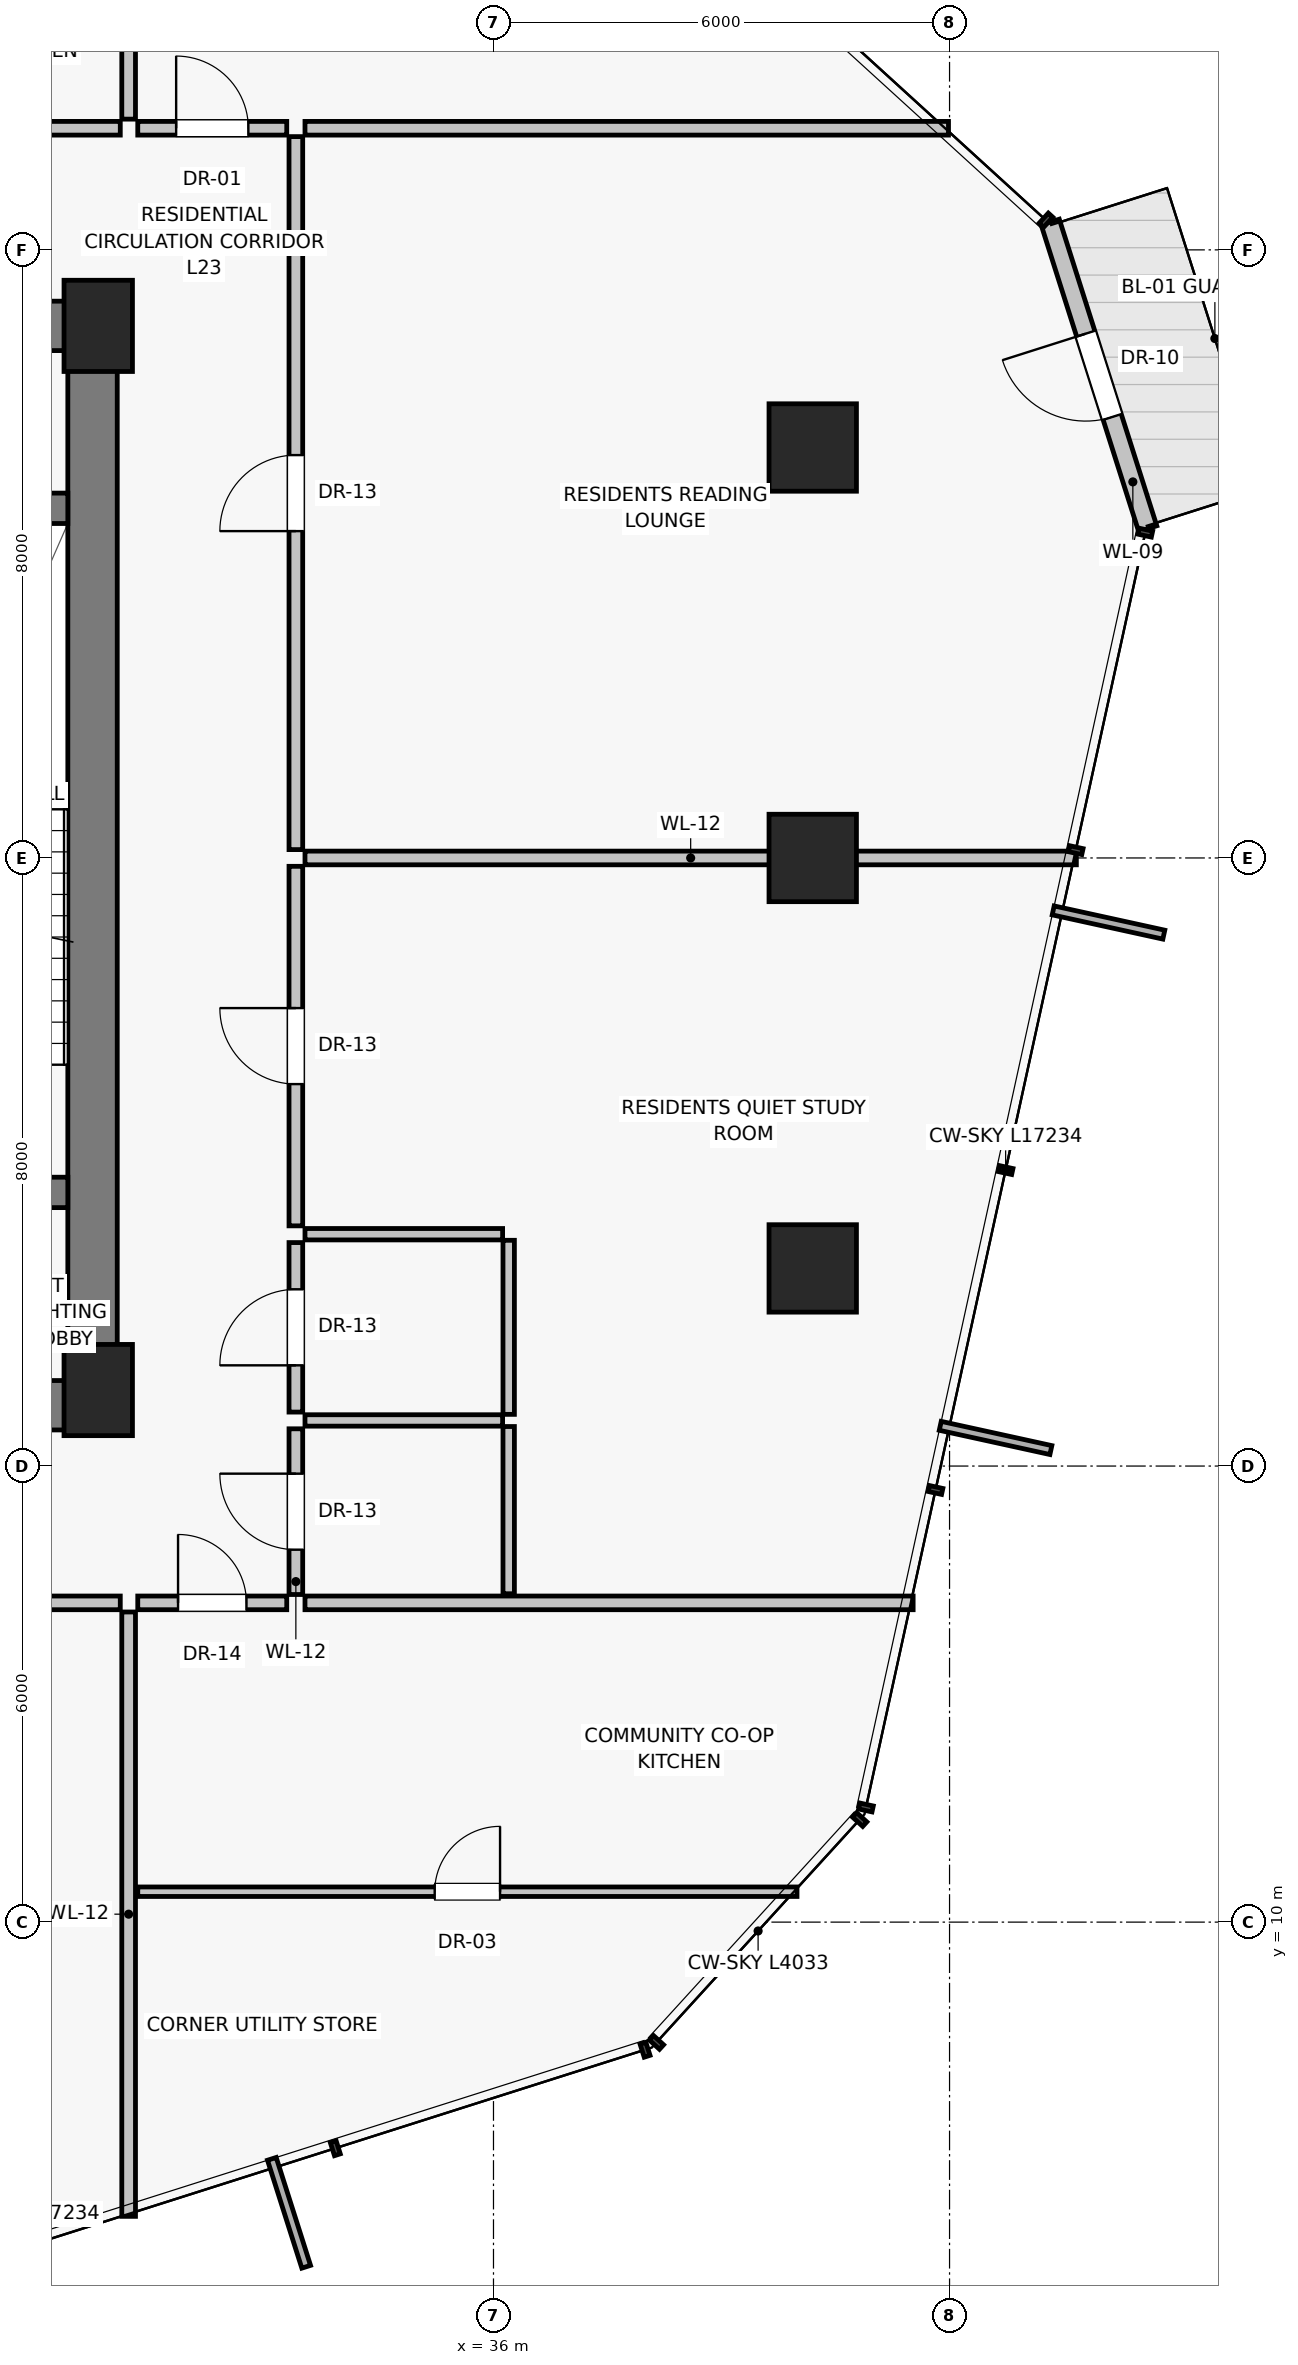
"""IFC4 building model, lengths in metres.
Left out: names, types, materials, properties, quantities, classifications, styles, units other than length and angle.
Written with IfcOpenShell. Run it as: python <this file> out.ifc"""

import sys

from ifc_helpers import new_model, si_unit, direction, frame, frame_2d, origin, origin_2d, place, context, subcontext, project, spatial, rectangle, extrude, source, transform, mapped, element, fill, save


model = new_model("IFC4")
c1 = context("Model", 3, precision=1e-05, world=origin(), true_north=direction((0.0, 1.0)))
c2 = subcontext(c1, "Body", "Model", "MODEL_VIEW")
j1 = project(units=[si_unit("LENGTHUNIT", "METRE"), si_unit("PLANEANGLEUNIT", "RADIAN")], contexts=[c1])
p1 = place(None, origin())
s1 = spatial("IfcSite", under=j1, at=p1, CompositionType="ELEMENT")
p2 = place(p1, origin())
s2 = spatial("IfcBuilding", under=s1, at=p2, CompositionType="ELEMENT")
p3 = place(p2, frame((0.0, 0.0, 85.15)))
s3 = spatial("IfcBuildingStorey", under=s2, at=p3, CompositionType="ELEMENT", Elevation=85.15)
for number, where, z_axis, x_axis in (
    (1, (30.8, 17.0, 0.0), (0.0, 0.0, 1.0), (1.0, 0.0, 0.0)),
    (2, (30.8, 31.0, 0.0), (0.0, 0.0, 1.0), (1.0, 0.0, 0.0)),
):
    element("IfcColumn", number, at=place(p3, frame(where, z_axis=z_axis, x_axis=x_axis)), inside=s3, PredefinedType="PILASTER", context=c2, shape_type="SweptSolid", body=[
        extrude(rectangle(XDim=0.9, YDim=1.2, at=origin_2d()), origin(), (0.0, 0.0, 1.0), 4.3),
    ])
for number, where, z_axis, x_axis in (
    (3, (40.2, 18.6, -0.32), (0.0, 0.0, 1.0), (1.0, 0.0, 0.0)),
    (4, (40.2, 24.0, -0.32), (0.0, 0.0, 1.0), (1.0, 0.0, 0.0)),
    (5, (40.2, 29.4, -0.32), (0.0, 0.0, 1.0), (1.0, 0.0, 0.0)),
):
    element("IfcColumn", number, at=place(p3, frame(where, z_axis=z_axis, x_axis=x_axis)), inside=s3, PredefinedType="COLUMN", context=c2, shape_type="SweptSolid", body=[
        extrude(rectangle(XDim=1.15, YDim=1.15, at=origin_2d()), origin(), (0.0, 0.0, 1.0), 4.62),
    ])
p4 = place(p3, frame((44.607, 28.332, 0.0), z_axis=(0.0, 0.0, 1.0), x_axis=(-0.303013211756, 0.952986355359, 0.0)))
e6 = element("IfcWall", 6, at=p4, inside=s3, PredefinedType="SOLIDWALL", context=c2, shape_type="SweptSolid", body=[
    extrude(rectangle(XDim=4.233, YDim=0.25, at=frame_2d((2.117, 0.0))), origin(), (0.0, 0.0, 1.0), 4.05),
])
p5 = place(p4, frame((1.542, 0.0, 0.0)))
e7 = element("IfcOpeningElement", 7, at=p5, cuts=e6, PredefinedType="OPENING", context=c2, shape_type="SweptSolid", body=[
    extrude(rectangle(XDim=1.15, YDim=2.25, at=frame_2d((0.575, 1.125))), frame((0.0, 0.135, 0.0), z_axis=(0.0, -1.0, 0.0), x_axis=(1.0, 0.0, 0.0)), (0.0, 0.0, 1.0), 0.27),
])
p6 = place(p3, frame((30.725, 16.8, 0.0), z_axis=(0.0, 0.0, 1.0), x_axis=(0.0, 1.0, 0.0)))
e8 = element("IfcWall", 8, at=p6, inside=s3, PredefinedType="SHEAR", context=c2, shape_type="SweptSolid", body=[
    extrude(rectangle(XDim=14.2, YDim=0.65, at=frame_2d((7.1, 0.0))), origin(), (0.0, 0.0, 1.0), 4.05),
])
p7 = place(p3, frame((24.95, 16.8, 0.0), z_axis=(0.0, 0.0, 1.0), x_axis=(1.0, 0.0, 0.0)))
e9 = element("IfcWall", 9, at=p7, inside=s3, PredefinedType="SHEAR", context=c2, shape_type="SweptSolid", body=[
    extrude(rectangle(XDim=5.85, YDim=0.65, at=frame_2d((2.925, 0.0))), origin(), (0.0, 0.0, 1.0), 4.05),
])
p8 = place(p7, frame((2.15, 0.0, 0.0)))
e10 = element("IfcOpeningElement", 10, at=p8, cuts=e9, PredefinedType="OPENING", context=c2, shape_type="SweptSolid", body=[
    extrude(rectangle(XDim=1.2, YDim=2.03, at=frame_2d((0.6, 1.015))), frame((0.0, 0.335, 0.0), z_axis=(0.0, -1.0, 0.0), x_axis=(1.0, 0.0, 0.0)), (0.0, 0.0, 1.0), 0.67),
])
p9 = place(p3, frame((27.0, 31.0, 0.0), z_axis=(0.0, 0.0, 1.0), x_axis=(1.0, 0.0, 0.0)))
e11 = element("IfcWall", 11, at=p9, inside=s3, PredefinedType="SHEAR", context=c2, shape_type="SweptSolid", body=[
    extrude(rectangle(XDim=3.8, YDim=0.65, at=frame_2d((1.9, 0.0))), origin(), (0.0, 0.0, 1.0), 4.05),
])
p10 = place(p9, frame((0.45, 0.0, 0.0)))
e12 = element("IfcOpeningElement", 12, at=p10, cuts=e11, PredefinedType="OPENING", context=c2, shape_type="SweptSolid", body=[
    extrude(rectangle(XDim=0.86, YDim=2.01, at=frame_2d((0.43, 1.005))), frame((0.0, 0.335, 0.0), z_axis=(0.0, -1.0, 0.0), x_axis=(1.0, 0.0, 0.0)), (0.0, 0.0, 1.0), 0.67),
])
p11 = place(p9, frame((1.9, 0.0, 0.0)))
e13 = element("IfcOpeningElement", 13, at=p11, cuts=e11, PredefinedType="OPENING", context=c2, shape_type="SweptSolid", body=[
    extrude(rectangle(XDim=0.86, YDim=2.01, at=frame_2d((0.43, 1.005))), frame((0.0, 0.335, 0.0), z_axis=(0.0, -1.0, 0.0), x_axis=(1.0, 0.0, 0.0)), (0.0, 0.0, 1.0), 0.67),
])
p12 = place(p3, frame((27.0, 19.6, 0.0), z_axis=(0.0, 0.0, 1.0), x_axis=(1.0, 0.0, 0.0)))
e14 = element("IfcWall", 14, at=p12, inside=s3, PredefinedType="SHEAR", context=c2, shape_type="SweptSolid", body=[
    extrude(rectangle(XDim=3.4, YDim=0.4, at=frame_2d((1.7, 0.0))), origin(), (0.0, 0.0, 1.0), 4.05),
])
p13 = place(p12, frame((1.05, 0.0, 0.0)))
e15 = element("IfcOpeningElement", 15, at=p13, cuts=e14, PredefinedType="OPENING", context=c2, shape_type="SweptSolid", body=[
    extrude(rectangle(XDim=1.1, YDim=2.03, at=frame_2d((0.55, 1.015))), frame((0.0, 0.21, 0.0), z_axis=(0.0, -1.0, 0.0), x_axis=(1.0, 0.0, 0.0)), (0.0, 0.0, 1.0), 0.42),
])
p14 = place(p3, frame((27.0, 28.6, 0.0), z_axis=(0.0, 0.0, 1.0), x_axis=(1.0, 0.0, 0.0)))
e16 = element("IfcWall", 16, at=p14, inside=s3, PredefinedType="SHEAR", context=c2, shape_type="SweptSolid", body=[
    extrude(rectangle(XDim=3.4, YDim=0.4, at=frame_2d((1.7, 0.0))), origin(), (0.0, 0.0, 1.0), 4.05),
])
p15 = place(p3, frame((31.2, 14.08, 0.0), z_axis=(0.0, 0.0, 1.0), x_axis=(0.0, -1.0, 0.0)))
e17 = element("IfcWall", 17, at=p15, inside=s3, PredefinedType="PARTITIONING", context=c2, shape_type="SweptSolid", body=[
    extrude(rectangle(XDim=7.951, YDim=0.18, at=frame_2d((3.976, 0.0))), origin(), (0.0, 0.0, 1.0), 4.05),
])
p16 = place(p3, frame((25.118, 14.2, 0.0), z_axis=(0.0, 0.0, 1.0), x_axis=(1.0, 0.0, 0.0)))
e18 = element("IfcWall", 18, at=p16, inside=s3, PredefinedType="PARTITIONING", context=c2, shape_type="SweptSolid", body=[
    extrude(rectangle(XDim=5.972, YDim=0.18, at=frame_2d((2.986, 0.0))), origin(), (0.0, 0.0, 1.0), 4.05),
])
p17 = place(p16, frame((2.486, 0.0, 0.0)))
e19 = element("IfcOpeningElement", 19, at=p17, cuts=e18, PredefinedType="OPENING", context=c2, shape_type="SweptSolid", body=[
    extrude(rectangle(XDim=1.0, YDim=2.01, at=frame_2d((0.5, 1.005))), frame((0.0, 0.1, 0.0), z_axis=(0.0, -1.0, 0.0), x_axis=(1.0, 0.0, 0.0)), (0.0, 0.0, 1.0), 0.2),
])
p18 = place(p3, frame((31.2, 33.72, 0.0), z_axis=(0.0, 0.0, 1.0), x_axis=(0.0, 1.0, 0.0)))
e20 = element("IfcWall", 20, at=p18, inside=s3, PredefinedType="PARTITIONING", context=c2, shape_type="SweptSolid", body=[
    extrude(rectangle(XDim=9.715, YDim=0.18, at=frame_2d((4.858, 0.0))), origin(), (0.0, 0.0, 1.0), 4.05),
])
p19 = place(p3, frame((21.23, 33.6, 0.0), z_axis=(0.0, 0.0, 1.0), x_axis=(1.0, 0.0, 0.0)))
e21 = element("IfcWall", 21, at=p19, inside=s3, PredefinedType="PARTITIONING", context=c2, shape_type="SweptSolid", body=[
    extrude(rectangle(XDim=9.86, YDim=0.18, at=frame_2d((4.93, 0.0))), origin(), (0.0, 0.0, 1.0), 4.05),
])
p20 = place(p19, frame((3.276, 0.0, 0.0)))
e22 = element("IfcOpeningElement", 22, at=p20, cuts=e21, PredefinedType="OPENING", context=c2, shape_type="SweptSolid", body=[
    extrude(rectangle(XDim=0.95, YDim=2.02, at=frame_2d((0.475, 1.01))), frame((0.0, 0.1, 0.0), z_axis=(0.0, -1.0, 0.0), x_axis=(1.0, 0.0, 0.0)), (0.0, 0.0, 1.0), 0.2),
])
p21 = place(p3, frame((33.52, 14.2, 0.0), z_axis=(0.0, 0.0, 1.0), x_axis=(1.0, 0.0, 0.0)))
e23 = element("IfcWall", 23, at=p21, inside=s3, PredefinedType="PARTITIONING", context=c2, shape_type="SweptSolid", body=[
    extrude(rectangle(XDim=8.001, YDim=0.18, at=frame_2d((4.0, 0.0))), origin(), (0.0, 0.0, 1.0), 4.05),
])
p22 = place(p3, frame((33.52, 33.6, 0.0), z_axis=(0.0, 0.0, 1.0), x_axis=(1.0, 0.0, 0.0)))
e24 = element("IfcWall", 24, at=p22, inside=s3, PredefinedType="PARTITIONING", context=c2, shape_type="SweptSolid", body=[
    extrude(rectangle(XDim=8.466, YDim=0.18, at=frame_2d((4.233, 0.0))), origin(), (0.0, 0.0, 1.0), 4.05),
])
p23 = place(p3, frame((33.4, 14.31, 0.0), z_axis=(0.0, 0.0, 1.0), x_axis=(0.0, 1.0, 0.0)))
e25 = element("IfcWall", 25, at=p23, inside=s3, PredefinedType="PARTITIONING", context=c2, shape_type="SweptSolid", body=[
    extrude(rectangle(XDim=2.18, YDim=0.18, at=frame_2d((1.09, 0.0))), origin(), (0.0, 0.0, 1.0), 4.05),
])
p24 = place(p23, frame((0.59, 0.0, 0.0)))
e26 = element("IfcOpeningElement", 26, at=p24, cuts=e25, PredefinedType="OPENING", context=c2, shape_type="SweptSolid", body=[
    extrude(rectangle(XDim=1.0, YDim=2.01, at=frame_2d((0.5, 1.005))), frame((0.0, 0.1, 0.0), z_axis=(0.0, -1.0, 0.0), x_axis=(1.0, 0.0, 0.0)), (0.0, 0.0, 1.0), 0.2),
])
p25 = place(p3, frame((33.4, 16.71, 0.0), z_axis=(0.0, 0.0, 1.0), x_axis=(0.0, 1.0, 0.0)))
e27 = element("IfcWall", 27, at=p25, inside=s3, PredefinedType="PARTITIONING", context=c2, shape_type="SweptSolid", body=[
    extrude(rectangle(XDim=2.23, YDim=0.18, at=frame_2d((1.115, 0.0))), origin(), (0.0, 0.0, 1.0), 4.05),
])
p26 = place(p25, frame((0.615, 0.0, 0.0)))
e28 = element("IfcOpeningElement", 28, at=p26, cuts=e27, PredefinedType="OPENING", context=c2, shape_type="SweptSolid", body=[
    extrude(rectangle(XDim=1.0, YDim=2.01, at=frame_2d((0.5, 1.005))), frame((0.0, 0.1, 0.0), z_axis=(0.0, -1.0, 0.0), x_axis=(1.0, 0.0, 0.0)), (0.0, 0.0, 1.0), 0.2),
])
p27 = place(p3, frame((33.4, 19.16, 0.0), z_axis=(0.0, 0.0, 1.0), x_axis=(0.0, 1.0, 0.0)))
e29 = element("IfcWall", 29, at=p27, inside=s3, PredefinedType="PARTITIONING", context=c2, shape_type="SweptSolid", body=[
    extrude(rectangle(XDim=4.73, YDim=0.18, at=frame_2d((2.365, 0.0))), origin(), (0.0, 0.0, 1.0), 4.05),
])
p28 = place(p27, frame((1.865, 0.0, 0.0)))
e30 = element("IfcOpeningElement", 30, at=p28, cuts=e29, PredefinedType="OPENING", context=c2, shape_type="SweptSolid", body=[
    extrude(rectangle(XDim=1.0, YDim=2.01, at=frame_2d((0.5, 1.005))), frame((0.0, 0.1, 0.0), z_axis=(0.0, -1.0, 0.0), x_axis=(1.0, 0.0, 0.0)), (0.0, 0.0, 1.0), 0.2),
])
p29 = place(p3, frame((33.4, 24.11, 0.0), z_axis=(0.0, 0.0, 1.0), x_axis=(0.0, 1.0, 0.0)))
e31 = element("IfcWall", 31, at=p29, inside=s3, PredefinedType="PARTITIONING", context=c2, shape_type="SweptSolid", body=[
    extrude(rectangle(XDim=9.38, YDim=0.18, at=frame_2d((4.69, 0.0))), origin(), (0.0, 0.0, 1.0), 4.05),
])
p30 = place(p29, frame((4.19, 0.0, 0.0)))
e32 = element("IfcOpeningElement", 32, at=p30, cuts=e31, PredefinedType="OPENING", context=c2, shape_type="SweptSolid", body=[
    extrude(rectangle(XDim=1.0, YDim=2.01, at=frame_2d((0.5, 1.005))), frame((0.0, 0.1, 0.0), z_axis=(0.0, -1.0, 0.0), x_axis=(1.0, 0.0, 0.0)), (0.0, 0.0, 1.0), 0.2),
])
for number, where, z_axis, x_axis in (
    (33, (33.52, 16.6, 0.0), (0.0, 0.0, 1.0), (1.0, 0.0, 0.0)),
    (34, (33.52, 19.05, 0.0), (0.0, 0.0, 1.0), (1.0, 0.0, 0.0)),
):
    element("IfcWall", number, at=place(p3, frame(where, z_axis=z_axis, x_axis=x_axis)), inside=s3, PredefinedType="PARTITIONING", context=c2, shape_type="SweptSolid", body=[
        extrude(rectangle(XDim=2.6, YDim=0.15, at=frame_2d((1.3, 0.0))), origin(), (0.0, 0.0, 1.0), 4.05),
    ])
p31 = place(p3, frame((36.2, 14.32, 0.0), z_axis=(0.0, 0.0, 1.0), x_axis=(0.0, 1.0, 0.0)))
e35 = element("IfcWall", 35, at=p31, inside=s3, PredefinedType="PARTITIONING", context=c2, shape_type="SweptSolid", body=[
    extrude(rectangle(XDim=2.2, YDim=0.15, at=frame_2d((1.1, 0.0))), origin(), (0.0, 0.0, 1.0), 4.05),
])
p32 = place(p3, frame((36.2, 16.68, 0.0), z_axis=(0.0, 0.0, 1.0), x_axis=(0.0, 1.0, 0.0)))
e36 = element("IfcWall", 36, at=p32, inside=s3, PredefinedType="PARTITIONING", context=c2, shape_type="SweptSolid", body=[
    extrude(rectangle(XDim=2.29, YDim=0.15, at=frame_2d((1.145, 0.0))), origin(), (0.0, 0.0, 1.0), 3.63),
])
p33 = place(p3, frame((33.52, 24.0, 0.0), z_axis=(0.0, 0.0, 1.0), x_axis=(1.0, 0.0, 0.0)))
e37 = element("IfcWall", 37, at=p33, inside=s3, PredefinedType="PARTITIONING", context=c2, shape_type="SweptSolid", body=[
    extrude(rectangle(XDim=10.148, YDim=0.18, at=frame_2d((5.074, 0.0))), origin(), (0.0, 0.0, 1.0), 4.05),
])
p34 = place(p3, frame((31.32, 14.2, 0.0), z_axis=(0.0, 0.0, 1.0), x_axis=(1.0, 0.0, 0.0)))
e38 = element("IfcWall", 38, at=p34, inside=s3, PredefinedType="PARTITIONING", context=c2, shape_type="SweptSolid", body=[
    extrude(rectangle(XDim=1.96, YDim=0.18, at=frame_2d((0.98, 0.0))), origin(), (0.0, 0.0, 1.0), 4.05),
])
p35 = place(p34, frame((0.53, 0.0, 0.0)))
e39 = element("IfcOpeningElement", 39, at=p35, cuts=e38, PredefinedType="OPENING", context=c2, shape_type="SweptSolid", body=[
    extrude(rectangle(XDim=0.9, YDim=2.01, at=frame_2d((0.45, 1.005))), frame((0.0, 0.1, 0.0), z_axis=(0.0, -1.0, 0.0), x_axis=(1.0, 0.0, 0.0)), (0.0, 0.0, 1.0), 0.2),
])
p36 = place(p3, frame((31.32, 10.4, 0.0), z_axis=(0.0, 0.0, 1.0), x_axis=(1.0, 0.0, 0.0)))
e40 = element("IfcWall", 40, at=p36, inside=s3, PredefinedType="PARTITIONING", context=c2, shape_type="SweptSolid", body=[
    extrude(rectangle(XDim=8.673, YDim=0.125, at=frame_2d((4.336, 0.0))), origin(), (0.0, 0.0, 1.0), 4.05),
])
p37 = place(p36, frame((3.906, 0.0, 0.0)))
e41 = element("IfcOpeningElement", 41, at=p37, cuts=e40, PredefinedType="OPENING", context=c2, shape_type="SweptSolid", body=[
    extrude(rectangle(XDim=0.86, YDim=2.01, at=frame_2d((0.43, 1.005))), frame((0.0, 0.073, 0.0), z_axis=(0.0, -1.0, 0.0), x_axis=(1.0, 0.0, 0.0)), (0.0, 0.0, 1.0), 0.145),
])
p38 = place(p3, frame((31.32, 33.6, 0.0), z_axis=(0.0, 0.0, 1.0), x_axis=(1.0, 0.0, 0.0)))
e42 = element("IfcWall", 42, at=p38, inside=s3, PredefinedType="PARTITIONING", context=c2, shape_type="SweptSolid", body=[
    extrude(rectangle(XDim=1.96, YDim=0.18, at=frame_2d((0.98, 0.0))), origin(), (0.0, 0.0, 1.0), 4.05),
])
p39 = place(p38, frame((0.505, 0.0, 0.0)))
e43 = element("IfcOpeningElement", 43, at=p39, cuts=e42, PredefinedType="OPENING", context=c2, shape_type="SweptSolid", body=[
    extrude(rectangle(XDim=0.95, YDim=2.02, at=frame_2d((0.475, 1.01))), frame((0.0, 0.1, 0.0), z_axis=(0.0, -1.0, 0.0), x_axis=(1.0, 0.0, 0.0)), (0.0, 0.0, 1.0), 0.2),
])
m1 = source(origin(), c2, "Body", "SweptSolid", [
    extrude(rectangle(XDim=1.15, YDim=2.25, at=frame_2d((0.575, 1.125))), frame((0.0, 0.025, 0.0), z_axis=(0.0, -1.0, 0.0), x_axis=(1.0, 0.0, 0.0)), (0.0, 0.0, 1.0), 0.05),
])
p40 = place(p5, frame((1.15, 0.0, 0.0), z_axis=(0.0, 0.0, 1.0), x_axis=(-1.0, 0.0, 0.0)))
e44 = element("IfcDoor", 44, at=p40, inside=s3, OperationType="SINGLE_SWING_RIGHT", PredefinedType="DOOR", context=c2, shape_type="MappedRepresentation", body=[
    mapped(m1, transform((0.0, 0.0, 0.0), scale=1.0)),
])
fill(e7, e44)
m2 = source(origin(), c2, "Body", "SweptSolid", [
    extrude(rectangle(XDim=1.0, YDim=2.01, at=frame_2d((0.5, 1.005))), frame((0.0, 0.025, 0.0), z_axis=(0.0, -1.0, 0.0), x_axis=(1.0, 0.0, 0.0)), (0.0, 0.0, 1.0), 0.05),
])
p41 = place(p24, origin())
e45 = element("IfcDoor", 45, at=p41, inside=s3, OperationType="SINGLE_SWING_RIGHT", PredefinedType="DOOR", context=c2, shape_type="MappedRepresentation", body=[
    mapped(m2, transform((0.0, 0.0, 0.0), scale=1.0)),
])
fill(e26, e45)
p42 = place(p26, origin())
e46 = element("IfcDoor", 46, at=p42, inside=s3, OperationType="SINGLE_SWING_LEFT", PredefinedType="DOOR", context=c2, shape_type="MappedRepresentation", body=[
    mapped(m2, transform((0.0, 0.0, 0.0), scale=1.0)),
])
fill(e28, e46)
p43 = place(p28, origin())
e47 = element("IfcDoor", 47, at=p43, inside=s3, OperationType="SINGLE_SWING_RIGHT", PredefinedType="DOOR", context=c2, shape_type="MappedRepresentation", body=[
    mapped(m2, transform((0.0, 0.0, 0.0), scale=1.0)),
])
fill(e30, e47)
p44 = place(p30, origin())
e48 = element("IfcDoor", 48, at=p44, inside=s3, OperationType="SINGLE_SWING_LEFT", PredefinedType="DOOR", context=c2, shape_type="MappedRepresentation", body=[
    mapped(m2, transform((0.0, 0.0, 0.0), scale=1.0)),
])
fill(e32, e48)
m3 = source(origin(), c2, "Body", "SweptSolid", [
    extrude(rectangle(XDim=0.9, YDim=2.01, at=frame_2d((0.45, 1.005))), frame((0.0, 0.025, 0.0), z_axis=(0.0, -1.0, 0.0), x_axis=(1.0, 0.0, 0.0)), (0.0, 0.0, 1.0), 0.05),
])
p45 = place(p35, origin())
e49 = element("IfcDoor", 49, at=p45, inside=s3, OperationType="SINGLE_SWING_LEFT", PredefinedType="DOOR", context=c2, shape_type="MappedRepresentation", body=[
    mapped(m3, transform((0.0, 0.0, 0.0), scale=1.0)),
])
fill(e39, e49)
m4 = source(origin(), c2, "Body", "SweptSolid", [
    extrude(rectangle(XDim=0.86, YDim=2.01, at=frame_2d((0.43, 1.005))), frame((0.0, 0.025, 0.0), z_axis=(0.0, -1.0, 0.0), x_axis=(1.0, 0.0, 0.0)), (0.0, 0.0, 1.0), 0.05),
])
p46 = place(p37, origin())
e50 = element("IfcDoor", 50, at=p46, inside=s3, OperationType="SINGLE_SWING_RIGHT", PredefinedType="DOOR", context=c2, shape_type="MappedRepresentation", body=[
    mapped(m4, transform((0.0, 0.0, 0.0), scale=1.0)),
])
fill(e41, e50)
m5 = source(origin(), c2, "Body", "SweptSolid", [
    extrude(rectangle(XDim=0.95, YDim=2.02, at=frame_2d((0.475, 1.01))), frame((0.0, 0.025, 0.0), z_axis=(0.0, -1.0, 0.0), x_axis=(1.0, 0.0, 0.0)), (0.0, 0.0, 1.0), 0.05),
])
p47 = place(p39, origin())
e51 = element("IfcDoor", 51, at=p47, inside=s3, OperationType="SINGLE_SWING_LEFT", PredefinedType="DOOR", context=c2, shape_type="MappedRepresentation", body=[
    mapped(m5, transform((0.0, 0.0, 0.0), scale=1.0)),
])
fill(e43, e51)
save(model, sys.argv[1])
